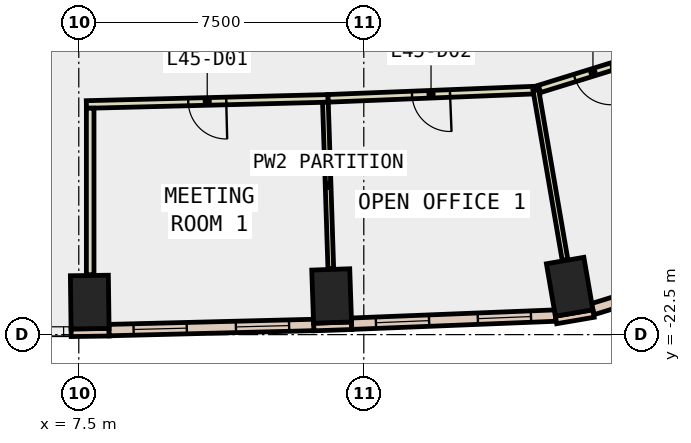
"""IFC4 building model, lengths in metres.
Left out: names, types, materials, properties, quantities, classifications, styles, units other than length and angle.
Written with IfcOpenShell. Run it as: python <this file> out.ifc"""

import sys

from ifc_helpers import new_model, si_unit, direction, frame, frame_2d, origin, origin_2d, place, context, subcontext, project, spatial, rectangle, extrude, element, fill, save


model = new_model("IFC4")
c1 = context("Model", 3, precision=1e-05, world=origin(), true_north=direction((0.0, 1.0)))
c2 = subcontext(c1, "Body", "Model", "MODEL_VIEW")
j1 = project(units=[si_unit("LENGTHUNIT", "METRE"), si_unit("PLANEANGLEUNIT", "RADIAN")], contexts=[c1])
p1 = place(None, origin())
s1 = spatial("IfcSite", under=j1, at=p1, CompositionType="ELEMENT")
p2 = place(p1, origin())
s2 = spatial("IfcBuilding", under=s1, at=p2, CompositionType="ELEMENT")
p3 = place(p2, frame((0.0, 0.0, 202.4)))
s3 = spatial("IfcBuildingStorey", under=s2, at=p3, CompositionType="ELEMENT", Elevation=202.4)
for number, where, z_axis, x_axis in (
    (1, (7.788, -21.644, -0.4), (0.0, 0.0, 1.0), (1.0, 0.013, 0.0)),
    (2, (14.154, -21.484, -0.4), (0.0, 0.0, 1.0), (0.999, 0.034, 0.0)),
    (3, (20.417, -21.241, -0.4), (0.0, 0.0, 1.0), (0.986, 0.169, 0.0)),
):
    element("IfcColumn", number, at=place(p3, frame(where, z_axis=z_axis, x_axis=x_axis)), inside=s3, PredefinedType="COLUMN", context=c2, shape_type="SweptSolid", body=[
        extrude(rectangle(XDim=1.0, YDim=1.4, at=origin_2d()), origin(), (0.0, 0.0, 1.0), 4.2),
    ])
p4 = place(p3, frame((7.299, -22.451, 0.0), z_axis=(0.0, 0.0, 1.0), x_axis=(0.999903186316, 0.013914668364, 0.0)))
e4 = element("IfcWall", 4, at=p4, inside=s3, PredefinedType="STANDARD", context=c2, shape_type="SweptSolid", body=[
    extrude(rectangle(XDim=1.0, YDim=0.2, at=frame_2d((0.5, 0.0))), origin(), (0.0, 0.0, 1.0), 3.8),
])
p5 = place(p3, frame((13.682, -22.3, 0.0), z_axis=(0.0, 0.0, 1.0), x_axis=(0.999423561854, 0.033949138587, 0.0)))
e5 = element("IfcWall", 5, at=p5, inside=s3, PredefinedType="STANDARD", context=c2, shape_type="SweptSolid", body=[
    extrude(rectangle(XDim=1.0, YDim=0.2, at=frame_2d((0.5, 0.0))), origin(), (0.0, 0.0, 1.0), 3.8),
])
p6 = place(p3, frame((20.059, -22.114, 0.0), z_axis=(0.0, 0.0, 1.0), x_axis=(0.985631544579, 0.168909615862, 0.0)))
e6 = element("IfcWall", 6, at=p6, inside=s3, PredefinedType="STANDARD", context=c2, shape_type="SweptSolid", body=[
    extrude(rectangle(XDim=1.0, YDim=0.2, at=frame_2d((0.5, 0.0))), origin(), (0.0, 0.0, 1.0), 3.8),
])
p7 = place(p3, frame((8.297, -22.381, 0.0), z_axis=(0.0, 0.0, 1.0), x_axis=(0.999685717988, 0.025069209235, 0.0)))
e7 = element("IfcWall", 7, at=p7, inside=s3, PredefinedType="STANDARD", context=c2, shape_type="SweptSolid", body=[
    extrude(rectangle(XDim=5.385, YDim=0.3, at=frame_2d((2.693, 0.0))), origin(), (0.0, 0.0, 1.0), 3.8),
])
p8 = place(p7, frame((0.646, 0.0, 0.9)))
e8 = element("IfcOpeningElement", 8, at=p8, cuts=e7, PredefinedType="OPENING", context=c2, shape_type="SweptSolid", body=[
    extrude(rectangle(XDim=1.4, YDim=2.6, at=frame_2d((0.7, 1.3))), frame((0.0, 0.16, 0.0), z_axis=(0.0, -1.0, 0.0), x_axis=(1.0, 0.0, 0.0)), (0.0, 0.0, 1.0), 0.32),
])
p9 = place(p7, frame((3.339, 0.0, 0.9)))
e9 = element("IfcOpeningElement", 9, at=p9, cuts=e7, PredefinedType="OPENING", context=c2, shape_type="SweptSolid", body=[
    extrude(rectangle(XDim=1.4, YDim=2.6, at=frame_2d((0.7, 1.3))), frame((0.0, 0.16, 0.0), z_axis=(0.0, -1.0, 0.0), x_axis=(1.0, 0.0, 0.0)), (0.0, 0.0, 1.0), 0.32),
])
p10 = place(p3, frame((14.679, -22.213, 0.0), z_axis=(0.0, 0.0, 1.0), x_axis=(0.999205241612, 0.039860822062, 0.0)))
e10 = element("IfcWall", 10, at=p10, inside=s3, PredefinedType="STANDARD", context=c2, shape_type="SweptSolid", body=[
    extrude(rectangle(XDim=5.365, YDim=0.3, at=frame_2d((2.683, 0.0))), origin(), (0.0, 0.0, 1.0), 3.8),
])
p11 = place(p10, frame((0.641, 0.0, 0.9)))
e11 = element("IfcOpeningElement", 11, at=p11, cuts=e10, PredefinedType="OPENING", context=c2, shape_type="SweptSolid", body=[
    extrude(rectangle(XDim=1.4, YDim=2.6, at=frame_2d((0.7, 1.3))), frame((0.0, 0.16, 0.0), z_axis=(0.0, -1.0, 0.0), x_axis=(1.0, 0.0, 0.0)), (0.0, 0.0, 1.0), 0.32),
])
p12 = place(p10, frame((3.324, 0.0, 0.9)))
e12 = element("IfcOpeningElement", 12, at=p12, cuts=e10, PredefinedType="OPENING", context=c2, shape_type="SweptSolid", body=[
    extrude(rectangle(XDim=1.4, YDim=2.6, at=frame_2d((0.7, 1.3))), frame((0.0, 0.16, 0.0), z_axis=(0.0, -1.0, 0.0), x_axis=(1.0, 0.0, 0.0)), (0.0, 0.0, 1.0), 0.32),
])
p13 = place(p3, frame((21.024, -21.83, 0.0), z_axis=(0.0, 0.0, 1.0), x_axis=(0.955247215067, 0.295808651171, 0.0)))
e13 = element("IfcWall", 13, at=p13, inside=s3, PredefinedType="STANDARD", context=c2, shape_type="SweptSolid", body=[
    extrude(rectangle(XDim=4.161, YDim=0.3, at=frame_2d((2.081, 0.0))), origin(), (0.0, 0.0, 1.0), 3.8),
])
p14 = place(p13, frame((1.381, 0.0, 0.9)))
e14 = element("IfcOpeningElement", 14, at=p14, cuts=e13, PredefinedType="OPENING", context=c2, shape_type="SweptSolid", body=[
    extrude(rectangle(XDim=1.4, YDim=2.6, at=frame_2d((0.7, 1.3))), frame((0.0, 0.16, 0.0), z_axis=(0.0, -1.0, 0.0), x_axis=(1.0, 0.0, 0.0)), (0.0, 0.0, 1.0), 0.32),
])
p15 = place(p3, frame((14.061, -16.284, 0.0), z_axis=(0.0, 0.0, 1.0), x_axis=(-0.999679323762, -0.025322907453, 0.0)))
e15 = element("IfcWall", 15, at=p15, inside=s3, PredefinedType="PARTITIONING", context=c2, shape_type="SweptSolid", body=[
    extrude(rectangle(XDim=6.363, YDim=0.2, at=frame_2d((3.182, 0.0))), origin(), (0.0, 0.0, 1.0), 3.8),
])
p16 = place(p15, frame((2.682, 0.0, 0.0)))
e16 = element("IfcOpeningElement", 16, at=p16, cuts=e15, PredefinedType="OPENING", context=c2, shape_type="SweptSolid", body=[
    extrude(rectangle(XDim=1.0, YDim=2.1, at=frame_2d((0.5, 1.05))), frame((0.0, 0.11, 0.0), z_axis=(0.0, -1.0, 0.0), x_axis=(1.0, 0.0, 0.0)), (0.0, 0.0, 1.0), 0.22),
])
p17 = place(p3, frame((19.627, -16.061, 0.0), z_axis=(0.0, 0.0, 1.0), x_axis=(-0.999206061563, -0.039840262741, 0.0)))
e17 = element("IfcWall", 17, at=p17, inside=s3, PredefinedType="PARTITIONING", context=c2, shape_type="SweptSolid", body=[
    extrude(rectangle(XDim=5.57, YDim=0.2, at=frame_2d((2.785, 0.0))), origin(), (0.0, 0.0, 1.0), 3.8),
])
p18 = place(p17, frame((2.36, 0.0, 0.0)))
e18 = element("IfcOpeningElement", 18, at=p18, cuts=e17, PredefinedType="OPENING", context=c2, shape_type="SweptSolid", body=[
    extrude(rectangle(XDim=1.0, YDim=2.1, at=frame_2d((0.5, 1.05))), frame((0.0, 0.11, 0.0), z_axis=(0.0, -1.0, 0.0), x_axis=(1.0, 0.0, 0.0)), (0.0, 0.0, 1.0), 0.22),
])
p19 = place(p3, frame((22.438, -15.163, 0.0), z_axis=(0.0, 0.0, 1.0), x_axis=(-0.955234616163, -0.295849333419, 0.0)))
e19 = element("IfcWall", 19, at=p19, inside=s3, PredefinedType="PARTITIONING", context=c2, shape_type="SweptSolid", body=[
    extrude(rectangle(XDim=2.947, YDim=0.2, at=frame_2d((1.473, 0.0))), origin(), (0.0, 0.0, 1.0), 3.8),
])
p20 = place(p19, frame((0.974, 0.0, 0.0)))
e20 = element("IfcOpeningElement", 20, at=p20, cuts=e19, PredefinedType="OPENING", context=c2, shape_type="SweptSolid", body=[
    extrude(rectangle(XDim=1.0, YDim=2.1, at=frame_2d((0.5, 1.05))), frame((0.0, 0.11, 0.0), z_axis=(0.0, -1.0, 0.0), x_axis=(1.0, 0.0, 0.0)), (0.0, 0.0, 1.0), 0.22),
])
p21 = place(p3, frame((7.8, -16.542, 0.0), z_axis=(0.0, 0.0, 1.0), x_axis=(0.0, -1.0, 0.0)))
e21 = element("IfcWall", 21, at=p21, inside=s3, PredefinedType="PARTITIONING", context=c2, shape_type="SweptSolid", body=[
    extrude(rectangle(XDim=4.382, YDim=0.2, at=frame_2d((2.191, 0.0))), origin(), (0.0, 0.0, 1.0), 3.8),
])
p22 = place(p3, frame((13.99, -16.386, 0.0), z_axis=(0.0, 0.0, 1.0), x_axis=(0.032438863816, -0.999473721573, 0.0)))
e22 = element("IfcWall", 22, at=p22, inside=s3, PredefinedType="PARTITIONING", context=c2, shape_type="SweptSolid", body=[
    extrude(rectangle(XDim=4.38, YDim=0.15, at=frame_2d((2.19, 0.0))), origin(), (0.0, 0.0, 1.0), 3.8),
])
p23 = place(p3, frame((19.527, -16.065, 0.0), z_axis=(0.0, 0.0, 1.0), x_axis=(0.169437821314, -0.985540879268, 0.0)))
e23 = element("IfcWall", 23, at=p23, inside=s3, PredefinedType="PARTITIONING", context=c2, shape_type="SweptSolid", body=[
    extrude(rectangle(XDim=4.531, YDim=0.15, at=frame_2d((2.266, 0.0))), origin(), (0.0, 0.0, 1.0), 3.8),
])
p24 = place(p8, origin())
e24 = element("IfcWindow", 24, at=p24, inside=s3, PartitioningType="SINGLE_PANEL", PredefinedType="WINDOW", context=c2, shape_type="SweptSolid", body=[
    extrude(rectangle(XDim=1.4, YDim=2.6, at=frame_2d((0.7, 1.3))), frame((0.0, 0.03, 0.0), z_axis=(0.0, -1.0, 0.0), x_axis=(1.0, 0.0, 0.0)), (0.0, 0.0, 1.0), 0.06),
])
fill(e8, e24)
p25 = place(p9, origin())
e25 = element("IfcWindow", 25, at=p25, inside=s3, PartitioningType="SINGLE_PANEL", PredefinedType="WINDOW", context=c2, shape_type="SweptSolid", body=[
    extrude(rectangle(XDim=1.4, YDim=2.6, at=frame_2d((0.7, 1.3))), frame((0.0, 0.03, 0.0), z_axis=(0.0, -1.0, 0.0), x_axis=(1.0, 0.0, 0.0)), (0.0, 0.0, 1.0), 0.06),
])
fill(e9, e25)
p26 = place(p11, origin())
e26 = element("IfcWindow", 26, at=p26, inside=s3, PartitioningType="SINGLE_PANEL", PredefinedType="WINDOW", context=c2, shape_type="SweptSolid", body=[
    extrude(rectangle(XDim=1.4, YDim=2.6, at=frame_2d((0.7, 1.3))), frame((0.0, 0.03, 0.0), z_axis=(0.0, -1.0, 0.0), x_axis=(1.0, 0.0, 0.0)), (0.0, 0.0, 1.0), 0.06),
])
fill(e11, e26)
p27 = place(p12, origin())
e27 = element("IfcWindow", 27, at=p27, inside=s3, PartitioningType="SINGLE_PANEL", PredefinedType="WINDOW", context=c2, shape_type="SweptSolid", body=[
    extrude(rectangle(XDim=1.4, YDim=2.6, at=frame_2d((0.7, 1.3))), frame((0.0, 0.03, 0.0), z_axis=(0.0, -1.0, 0.0), x_axis=(1.0, 0.0, 0.0)), (0.0, 0.0, 1.0), 0.06),
])
fill(e12, e27)
p28 = place(p16, origin())
e28 = element("IfcDoor", 28, at=p28, inside=s3, OperationType="SINGLE_SWING_LEFT", PredefinedType="DOOR", context=c2, shape_type="SweptSolid", body=[
    extrude(rectangle(XDim=1.0, YDim=2.1, at=frame_2d((0.5, 1.05))), frame((0.0, 0.025, 0.0), z_axis=(0.0, -1.0, 0.0), x_axis=(1.0, 0.0, 0.0)), (0.0, 0.0, 1.0), 0.05),
])
fill(e16, e28)
p29 = place(p18, origin())
e29 = element("IfcDoor", 29, at=p29, inside=s3, OperationType="SINGLE_SWING_LEFT", PredefinedType="DOOR", context=c2, shape_type="SweptSolid", body=[
    extrude(rectangle(XDim=1.0, YDim=2.1, at=frame_2d((0.5, 1.05))), frame((0.0, 0.025, 0.0), z_axis=(0.0, -1.0, 0.0), x_axis=(1.0, 0.0, 0.0)), (0.0, 0.0, 1.0), 0.05),
])
fill(e18, e29)
p30 = place(p20, origin())
e30 = element("IfcDoor", 30, at=p30, inside=s3, OperationType="SINGLE_SWING_LEFT", PredefinedType="DOOR", context=c2, shape_type="SweptSolid", body=[
    extrude(rectangle(XDim=1.0, YDim=2.1, at=frame_2d((0.5, 1.05))), frame((0.0, 0.025, 0.0), z_axis=(0.0, -1.0, 0.0), x_axis=(1.0, 0.0, 0.0)), (0.0, 0.0, 1.0), 0.05),
])
fill(e20, e30)
save(model, sys.argv[1])
